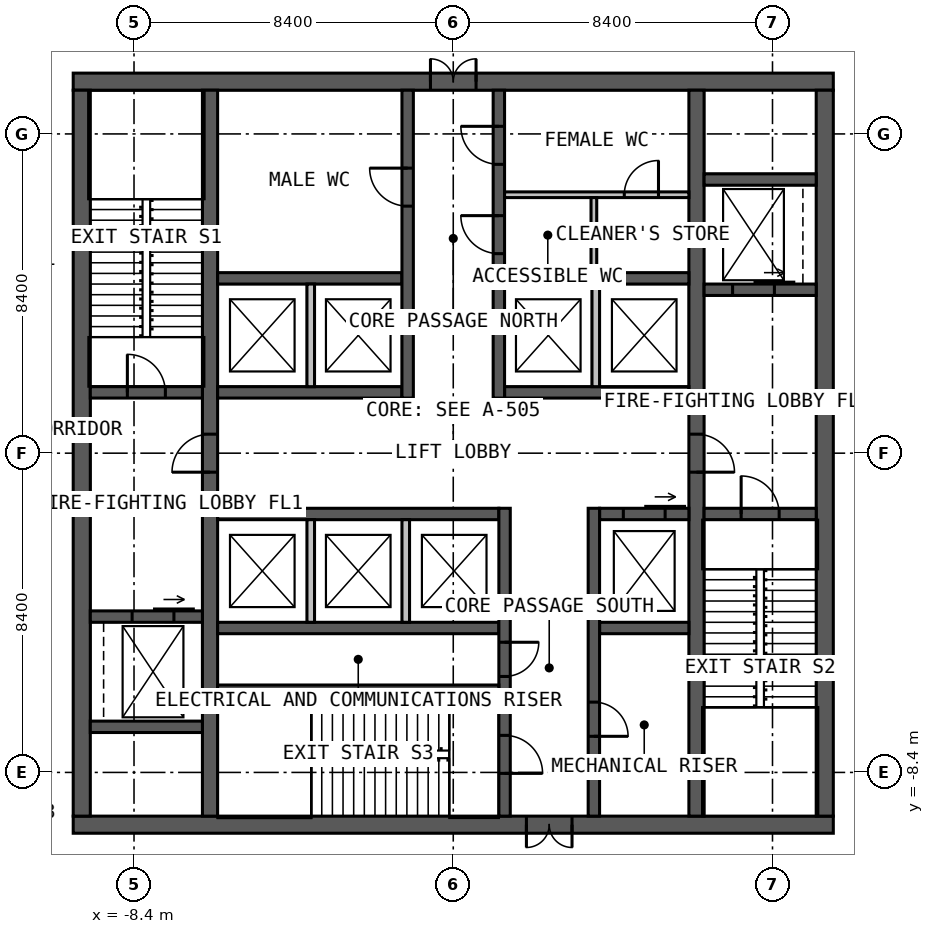
"""IFC4 building model, lengths in metres.
Left out: names, types, materials, properties, quantities, classifications, styles, units other than length and angle.
Written with IfcOpenShell. Run it as: python <this file> out.ifc"""

import sys

from ifc_helpers import new_model, si_unit, direction, frame, frame_2d, origin, place, context, subcontext, project, spatial, rectangle, extrude, element, fill, save


model = new_model("IFC4")
c1 = context("Model", 3, precision=1e-05, world=origin(), true_north=direction((0.0, 1.0)))
c2 = subcontext(c1, "Body", "Model", "MODEL_VIEW")
j1 = project(units=[si_unit("LENGTHUNIT", "METRE"), si_unit("PLANEANGLEUNIT", "RADIAN")], contexts=[c1])
p1 = place(None, origin())
s1 = spatial("IfcSite", under=j1, at=p1, CompositionType="ELEMENT")
p2 = place(p1, origin())
s2 = spatial("IfcBuilding", under=s1, at=p2, CompositionType="ELEMENT")
p3 = place(p2, frame((0.0, 0.0, 215.0)))
s3 = spatial("IfcBuildingStorey", under=s2, at=p3, CompositionType="ELEMENT", Elevation=215.0)
p4 = place(p3, frame((-10.0, 9.775, 0.0), z_axis=(0.0, 0.0, 1.0), x_axis=(1.0, 0.0, 0.0)))
e1 = element("IfcWall", 1, at=p4, inside=s3, PredefinedType="SOLIDWALL", context=c2, shape_type="SweptSolid", body=[
    extrude(rectangle(XDim=20.0, YDim=0.45, at=frame_2d((10.0, 0.0))), origin(), (0.0, 0.0, 1.0), 5.0),
])
p5 = place(p4, frame((9.4, 0.0, 0.0)))
e2 = element("IfcOpeningElement", 2, at=p5, cuts=e1, PredefinedType="OPENING", context=c2, shape_type="SweptSolid", body=[
    extrude(rectangle(XDim=1.2, YDim=2.2, at=frame_2d((0.6, 1.1))), frame((0.0, 0.235, 0.0), z_axis=(0.0, -1.0, 0.0), x_axis=(1.0, 0.0, 0.0)), (0.0, 0.0, 1.0), 0.47),
])
p6 = place(p3, frame((10.0, -9.775, 0.0), z_axis=(0.0, 0.0, 1.0), x_axis=(-1.0, 0.0, 0.0)))
e3 = element("IfcWall", 3, at=p6, inside=s3, PredefinedType="SOLIDWALL", context=c2, shape_type="SweptSolid", body=[
    extrude(rectangle(XDim=20.0, YDim=0.45, at=frame_2d((10.0, 0.0))), origin(), (0.0, 0.0, 1.0), 5.0),
])
p7 = place(p6, frame((6.875, 0.0, 0.0)))
e4 = element("IfcOpeningElement", 4, at=p7, cuts=e3, PredefinedType="OPENING", context=c2, shape_type="SweptSolid", body=[
    extrude(rectangle(XDim=1.2, YDim=2.2, at=frame_2d((0.6, 1.1))), frame((0.0, 0.235, 0.0), z_axis=(0.0, -1.0, 0.0), x_axis=(1.0, 0.0, 0.0)), (0.0, 0.0, 1.0), 0.47),
])
for number, where, z_axis, x_axis in (
    (5, (9.775, -9.55, 0.0), (0.0, 0.0, 1.0), (0.0, 1.0, 0.0)),
    (6, (-9.775, 9.55, 0.0), (0.0, 0.0, 1.0), (0.0, -1.0, 0.0)),
):
    element("IfcWall", number, at=place(p3, frame(where, z_axis=z_axis, x_axis=x_axis)), inside=s3, PredefinedType="SOLIDWALL", context=c2, shape_type="SweptSolid", body=[
        extrude(rectangle(XDim=19.1, YDim=0.45, at=frame_2d((9.55, 0.0))), origin(), (0.0, 0.0, 1.0), 5.0),
    ])
p8 = place(p3, frame((-6.4, -9.55, 0.0), z_axis=(0.0, 0.0, 1.0), x_axis=(0.0, 1.0, 0.0)))
e7 = element("IfcWall", 7, at=p8, inside=s3, PredefinedType="SOLIDWALL", context=c2, shape_type="SweptSolid", body=[
    extrude(rectangle(XDim=19.1, YDim=0.4, at=frame_2d((9.55, 0.0))), origin(), (0.0, 0.0, 1.0), 5.0),
])
p9 = place(p8, frame((9.05, 0.0, 0.0)))
e8 = element("IfcOpeningElement", 8, at=p9, cuts=e7, PredefinedType="OPENING", context=c2, shape_type="SweptSolid", body=[
    extrude(rectangle(XDim=1.0, YDim=2.2, at=frame_2d((0.5, 1.1))), frame((0.0, 0.21, 0.0), z_axis=(0.0, -1.0, 0.0), x_axis=(1.0, 0.0, 0.0)), (0.0, 0.0, 1.0), 0.42),
])
p10 = place(p3, frame((6.4, 9.55, 0.0), z_axis=(0.0, 0.0, 1.0), x_axis=(0.0, -1.0, 0.0)))
e9 = element("IfcWall", 9, at=p10, inside=s3, PredefinedType="SOLIDWALL", context=c2, shape_type="SweptSolid", body=[
    extrude(rectangle(XDim=19.1, YDim=0.4, at=frame_2d((9.55, 0.0))), origin(), (0.0, 0.0, 1.0), 5.0),
])
p11 = place(p10, frame((9.05, 0.0, 0.0)))
e10 = element("IfcOpeningElement", 10, at=p11, cuts=e9, PredefinedType="OPENING", context=c2, shape_type="SweptSolid", body=[
    extrude(rectangle(XDim=1.0, YDim=2.2, at=frame_2d((0.5, 1.1))), frame((0.0, 0.21, 0.0), z_axis=(0.0, -1.0, 0.0), x_axis=(1.0, 0.0, 0.0)), (0.0, 0.0, 1.0), 0.42),
])
for number, where, z_axis, x_axis in (
    (11, (-6.2, 1.6, 0.0), (0.0, 0.0, 1.0), (1.0, 0.0, 0.0)),
    (12, (1.35, 1.6, 0.0), (0.0, 0.0, 1.0), (1.0, 0.0, 0.0)),
    (13, (-6.2, 4.6, 0.0), (0.0, 0.0, 1.0), (1.0, 0.0, 0.0)),
    (14, (1.35, 4.6, 0.0), (0.0, 0.0, 1.0), (1.0, 0.0, 0.0)),
):
    element("IfcWall", number, at=place(p3, frame(where, z_axis=z_axis, x_axis=x_axis)), inside=s3, PredefinedType="SOLIDWALL", context=c2, shape_type="SweptSolid", body=[
        extrude(rectangle(XDim=4.85, YDim=0.3, at=frame_2d((2.425, 0.0))), origin(), (0.0, 0.0, 1.0), 5.0),
    ])
p12 = place(p3, frame((-1.2, 1.45, 0.0), z_axis=(0.0, 0.0, 1.0), x_axis=(0.0, 1.0, 0.0)))
e15 = element("IfcWall", 15, at=p12, inside=s3, PredefinedType="SOLIDWALL", context=c2, shape_type="SweptSolid", body=[
    extrude(rectangle(XDim=8.1, YDim=0.3, at=frame_2d((4.05, 0.0))), origin(), (0.0, 0.0, 1.0), 5.0),
])
p13 = place(p12, frame((5.05, 0.0, 0.0)))
e16 = element("IfcOpeningElement", 16, at=p13, cuts=e15, PredefinedType="OPENING", context=c2, shape_type="SweptSolid", body=[
    extrude(rectangle(XDim=1.0, YDim=2.2, at=frame_2d((0.5, 1.1))), frame((0.0, 0.16, 0.0), z_axis=(0.0, -1.0, 0.0), x_axis=(1.0, 0.0, 0.0)), (0.0, 0.0, 1.0), 0.32),
])
p14 = place(p3, frame((1.2, 1.45, 0.0), z_axis=(0.0, 0.0, 1.0), x_axis=(0.0, 1.0, 0.0)))
e17 = element("IfcWall", 17, at=p14, inside=s3, PredefinedType="SOLIDWALL", context=c2, shape_type="SweptSolid", body=[
    extrude(rectangle(XDim=8.1, YDim=0.3, at=frame_2d((4.05, 0.0))), origin(), (0.0, 0.0, 1.0), 5.0),
])
p15 = place(p14, frame((3.8, 0.0, 0.0)))
e18 = element("IfcOpeningElement", 18, at=p15, cuts=e17, PredefinedType="OPENING", context=c2, shape_type="SweptSolid", body=[
    extrude(rectangle(XDim=1.0, YDim=2.2, at=frame_2d((0.5, 1.1))), frame((0.0, 0.16, 0.0), z_axis=(0.0, -1.0, 0.0), x_axis=(1.0, 0.0, 0.0)), (0.0, 0.0, 1.0), 0.32),
])
p16 = place(p14, frame((6.15, 0.0, 0.0)))
e19 = element("IfcOpeningElement", 19, at=p16, cuts=e17, PredefinedType="OPENING", context=c2, shape_type="SweptSolid", body=[
    extrude(rectangle(XDim=1.0, YDim=2.2, at=frame_2d((0.5, 1.1))), frame((0.0, 0.16, 0.0), z_axis=(0.0, -1.0, 0.0), x_axis=(1.0, 0.0, 0.0)), (0.0, 0.0, 1.0), 0.32),
])
p17 = place(p3, frame((-6.2, -1.6, 0.0), z_axis=(0.0, 0.0, 1.0), x_axis=(1.0, 0.0, 0.0)))
e20 = element("IfcWall", 20, at=p17, inside=s3, PredefinedType="SOLIDWALL", context=c2, shape_type="SweptSolid", body=[
    extrude(rectangle(XDim=7.4, YDim=0.3, at=frame_2d((3.7, 0.0))), origin(), (0.0, 0.0, 1.0), 5.0),
])
p18 = place(p3, frame((3.85, -1.6, 0.0), z_axis=(0.0, 0.0, 1.0), x_axis=(1.0, 0.0, 0.0)))
e21 = element("IfcWall", 21, at=p18, inside=s3, PredefinedType="SOLIDWALL", context=c2, shape_type="SweptSolid", body=[
    extrude(rectangle(XDim=2.35, YDim=0.3, at=frame_2d((1.175, 0.0))), origin(), (0.0, 0.0, 1.0), 5.0),
])
p19 = place(p18, frame((0.625, 0.0, 0.0)))
e22 = element("IfcOpeningElement", 22, at=p19, cuts=e21, PredefinedType="OPENING", context=c2, shape_type="SweptSolid", body=[
    extrude(rectangle(XDim=1.1, YDim=2.2, at=frame_2d((0.55, 1.1))), frame((0.0, 0.16, 0.0), z_axis=(0.0, -1.0, 0.0), x_axis=(1.0, 0.0, 0.0)), (0.0, 0.0, 1.0), 0.32),
])
p20 = place(p3, frame((-6.2, -4.6, 0.0), z_axis=(0.0, 0.0, 1.0), x_axis=(1.0, 0.0, 0.0)))
e23 = element("IfcWall", 23, at=p20, inside=s3, PredefinedType="SOLIDWALL", context=c2, shape_type="SweptSolid", body=[
    extrude(rectangle(XDim=7.4, YDim=0.3, at=frame_2d((3.7, 0.0))), origin(), (0.0, 0.0, 1.0), 5.0),
])
p21 = place(p3, frame((3.85, -4.6, 0.0), z_axis=(0.0, 0.0, 1.0), x_axis=(1.0, 0.0, 0.0)))
e24 = element("IfcWall", 24, at=p21, inside=s3, PredefinedType="SOLIDWALL", context=c2, shape_type="SweptSolid", body=[
    extrude(rectangle(XDim=2.35, YDim=0.3, at=frame_2d((1.175, 0.0))), origin(), (0.0, 0.0, 1.0), 5.0),
])
p22 = place(p3, frame((1.35, -1.45, 0.0), z_axis=(0.0, 0.0, 1.0), x_axis=(0.0, -1.0, 0.0)))
e25 = element("IfcWall", 25, at=p22, inside=s3, PredefinedType="SOLIDWALL", context=c2, shape_type="SweptSolid", body=[
    extrude(rectangle(XDim=8.1, YDim=0.3, at=frame_2d((4.05, 0.0))), origin(), (0.0, 0.0, 1.0), 5.0),
])
p23 = place(p22, frame((5.975, 0.0, 0.0)))
e26 = element("IfcOpeningElement", 26, at=p23, cuts=e25, PredefinedType="OPENING", context=c2, shape_type="SweptSolid", body=[
    extrude(rectangle(XDim=1.0, YDim=2.2, at=frame_2d((0.5, 1.1))), frame((0.0, 0.16, 0.0), z_axis=(0.0, -1.0, 0.0), x_axis=(1.0, 0.0, 0.0)), (0.0, 0.0, 1.0), 0.32),
])
p24 = place(p22, frame((3.525, 0.0, 0.0)))
e27 = element("IfcOpeningElement", 27, at=p24, cuts=e25, PredefinedType="OPENING", context=c2, shape_type="SweptSolid", body=[
    extrude(rectangle(XDim=0.9, YDim=2.2, at=frame_2d((0.45, 1.1))), frame((0.0, 0.16, 0.0), z_axis=(0.0, -1.0, 0.0), x_axis=(1.0, 0.0, 0.0)), (0.0, 0.0, 1.0), 0.32),
])
p25 = place(p3, frame((3.7, -1.45, 0.0), z_axis=(0.0, 0.0, 1.0), x_axis=(0.0, -1.0, 0.0)))
e28 = element("IfcWall", 28, at=p25, inside=s3, PredefinedType="SOLIDWALL", context=c2, shape_type="SweptSolid", body=[
    extrude(rectangle(XDim=8.1, YDim=0.3, at=frame_2d((4.05, 0.0))), origin(), (0.0, 0.0, 1.0), 5.0),
])
p26 = place(p25, frame((5.1, 0.0, 0.0)))
e29 = element("IfcOpeningElement", 29, at=p26, cuts=e28, PredefinedType="OPENING", context=c2, shape_type="SweptSolid", body=[
    extrude(rectangle(XDim=0.9, YDim=2.2, at=frame_2d((0.45, 1.1))), frame((0.0, 0.16, 0.0), z_axis=(0.0, -1.0, 0.0), x_axis=(1.0, 0.0, 0.0)), (0.0, 0.0, 1.0), 0.32),
])
p27 = place(p3, frame((-6.2, -6.2, 0.0), z_axis=(0.0, 0.0, 1.0), x_axis=(1.0, 0.0, 0.0)))
e30 = element("IfcWall", 30, at=p27, inside=s3, PredefinedType="SOLIDWALL", context=c2, shape_type="SweptSolid", body=[
    extrude(rectangle(XDim=7.4, YDim=0.2, at=frame_2d((3.7, 0.0))), origin(), (0.0, 0.0, 1.0), 5.0),
])
p28 = place(p3, frame((-9.55, 1.6, 0.0), z_axis=(0.0, 0.0, 1.0), x_axis=(1.0, 0.0, 0.0)))
e31 = element("IfcWall", 31, at=p28, inside=s3, PredefinedType="SOLIDWALL", context=c2, shape_type="SweptSolid", body=[
    extrude(rectangle(XDim=2.95, YDim=0.3, at=frame_2d((1.475, 0.0))), origin(), (0.0, 0.0, 1.0), 5.0),
])
p29 = place(p28, frame((0.975, 0.0, 0.0)))
e32 = element("IfcOpeningElement", 32, at=p29, cuts=e31, PredefinedType="OPENING", context=c2, shape_type="SweptSolid", body=[
    extrude(rectangle(XDim=1.0, YDim=2.2, at=frame_2d((0.5, 1.1))), frame((0.0, 0.16, 0.0), z_axis=(0.0, -1.0, 0.0), x_axis=(1.0, 0.0, 0.0)), (0.0, 0.0, 1.0), 0.32),
])
p30 = place(p3, frame((6.6, -1.6, 0.0), z_axis=(0.0, 0.0, 1.0), x_axis=(1.0, 0.0, 0.0)))
e33 = element("IfcWall", 33, at=p30, inside=s3, PredefinedType="SOLIDWALL", context=c2, shape_type="SweptSolid", body=[
    extrude(rectangle(XDim=2.95, YDim=0.3, at=frame_2d((1.475, 0.0))), origin(), (0.0, 0.0, 1.0), 5.0),
])
p31 = place(p30, frame((0.975, 0.0, 0.0)))
e34 = element("IfcOpeningElement", 34, at=p31, cuts=e33, PredefinedType="OPENING", context=c2, shape_type="SweptSolid", body=[
    extrude(rectangle(XDim=1.0, YDim=2.2, at=frame_2d((0.5, 1.1))), frame((0.0, 0.16, 0.0), z_axis=(0.0, -1.0, 0.0), x_axis=(1.0, 0.0, 0.0)), (0.0, 0.0, 1.0), 0.32),
])
p32 = place(p3, frame((-9.55, -4.3, 0.0), z_axis=(0.0, 0.0, 1.0), x_axis=(1.0, 0.0, 0.0)))
e35 = element("IfcWall", 35, at=p32, inside=s3, PredefinedType="SOLIDWALL", context=c2, shape_type="SweptSolid", body=[
    extrude(rectangle(XDim=2.95, YDim=0.3, at=frame_2d((1.475, 0.0))), origin(), (0.0, 0.0, 1.0), 5.0),
])
p33 = place(p32, frame((1.1, 0.0, 0.0)))
e36 = element("IfcOpeningElement", 36, at=p33, cuts=e35, PredefinedType="OPENING", context=c2, shape_type="SweptSolid", body=[
    extrude(rectangle(XDim=1.1, YDim=2.2, at=frame_2d((0.55, 1.1))), frame((0.0, 0.16, 0.0), z_axis=(0.0, -1.0, 0.0), x_axis=(1.0, 0.0, 0.0)), (0.0, 0.0, 1.0), 0.32),
])
p34 = place(p3, frame((6.6, 4.3, 0.0), z_axis=(0.0, 0.0, 1.0), x_axis=(1.0, 0.0, 0.0)))
e37 = element("IfcWall", 37, at=p34, inside=s3, PredefinedType="SOLIDWALL", context=c2, shape_type="SweptSolid", body=[
    extrude(rectangle(XDim=2.95, YDim=0.3, at=frame_2d((1.475, 0.0))), origin(), (0.0, 0.0, 1.0), 5.0),
])
p35 = place(p34, frame((0.75, 0.0, 0.0)))
e38 = element("IfcOpeningElement", 38, at=p35, cuts=e37, PredefinedType="OPENING", context=c2, shape_type="SweptSolid", body=[
    extrude(rectangle(XDim=1.1, YDim=2.2, at=frame_2d((0.55, 1.1))), frame((0.0, 0.16, 0.0), z_axis=(0.0, -1.0, 0.0), x_axis=(1.0, 0.0, 0.0)), (0.0, 0.0, 1.0), 0.32),
])
for number, where, z_axis, x_axis in (
    (39, (-9.55, -7.2, 0.0), (0.0, 0.0, 1.0), (1.0, 0.0, 0.0)),
    (40, (6.6, 7.2, 0.0), (0.0, 0.0, 1.0), (1.0, 0.0, 0.0)),
):
    element("IfcWall", number, at=place(p3, frame(where, z_axis=z_axis, x_axis=x_axis)), inside=s3, PredefinedType="SOLIDWALL", context=c2, shape_type="SweptSolid", body=[
        extrude(rectangle(XDim=2.95, YDim=0.3, at=frame_2d((1.475, 0.0))), origin(), (0.0, 0.0, 1.0), 5.0),
    ])
for number, where, z_axis, x_axis in (
    (41, (-3.75, 1.75, 0.0), (0.0, 0.0, 1.0), (0.0, 1.0, 0.0)),
    (42, (3.75, 1.75, 0.0), (0.0, 0.0, 1.0), (0.0, 1.0, 0.0)),
    (43, (-3.75, -1.75, 0.0), (0.0, 0.0, 1.0), (0.0, -1.0, 0.0)),
    (44, (-1.25, -1.75, 0.0), (0.0, 0.0, 1.0), (0.0, -1.0, 0.0)),
):
    element("IfcWall", number, at=place(p3, frame(where, z_axis=z_axis, x_axis=x_axis)), inside=s3, PredefinedType="SOLIDWALL", context=c2, shape_type="SweptSolid", body=[
        extrude(rectangle(XDim=2.7, YDim=0.2, at=frame_2d((1.35, 0.0))), origin(), (0.0, 0.0, 1.0), 4.75),
    ])
p36 = place(p3, frame((1.35, 6.8, 0.0), z_axis=(0.0, 0.0, 1.0), x_axis=(1.0, 0.0, 0.0)))
e45 = element("IfcWall", 45, at=p36, inside=s3, PredefinedType="PARTITIONING", context=c2, shape_type="SweptSolid", body=[
    extrude(rectangle(XDim=4.85, YDim=0.15, at=frame_2d((2.425, 0.0))), origin(), (0.0, 0.0, 1.0), 4.75),
])
p37 = place(p36, frame((3.15, 0.0, 0.0)))
e46 = element("IfcOpeningElement", 46, at=p37, cuts=e45, PredefinedType="OPENING", context=c2, shape_type="SweptSolid", body=[
    extrude(rectangle(XDim=0.9, YDim=2.2, at=frame_2d((0.45, 1.1))), frame((0.0, 0.085, 0.0), z_axis=(0.0, -1.0, 0.0), x_axis=(1.0, 0.0, 0.0)), (0.0, 0.0, 1.0), 0.17),
])
p38 = place(p3, frame((3.7, 4.75, 0.0), z_axis=(0.0, 0.0, 1.0), x_axis=(0.0, 1.0, 0.0)))
e47 = element("IfcWall", 47, at=p38, inside=s3, PredefinedType="PARTITIONING", context=c2, shape_type="SweptSolid", body=[
    extrude(rectangle(XDim=1.975, YDim=0.15, at=frame_2d((0.988, 0.0))), origin(), (0.0, 0.0, 1.0), 4.75),
])
p39 = place(p5, origin())
e48 = element("IfcDoor", 48, at=p39, inside=s3, OperationType="DOUBLE_DOOR_SINGLE_SWING", PredefinedType="DOOR", context=c2, shape_type="SweptSolid", body=[
    extrude(rectangle(XDim=1.2, YDim=2.2, at=frame_2d((0.6, 1.1))), frame((0.0, 0.025, 0.0), z_axis=(0.0, -1.0, 0.0), x_axis=(1.0, 0.0, 0.0)), (0.0, 0.0, 1.0), 0.05),
])
fill(e2, e48)
p40 = place(p7, origin())
e49 = element("IfcDoor", 49, at=p40, inside=s3, OperationType="DOUBLE_DOOR_SINGLE_SWING", PredefinedType="DOOR", context=c2, shape_type="SweptSolid", body=[
    extrude(rectangle(XDim=1.2, YDim=2.2, at=frame_2d((0.6, 1.1))), frame((0.0, 0.025, 0.0), z_axis=(0.0, -1.0, 0.0), x_axis=(1.0, 0.0, 0.0)), (0.0, 0.0, 1.0), 0.05),
])
fill(e4, e49)
p41 = place(p9, origin())
e50 = element("IfcDoor", 50, at=p41, inside=s3, OperationType="SINGLE_SWING_LEFT", PredefinedType="DOOR", context=c2, shape_type="SweptSolid", body=[
    extrude(rectangle(XDim=1.0, YDim=2.2, at=frame_2d((0.5, 1.1))), frame((0.0, 0.025, 0.0), z_axis=(0.0, -1.0, 0.0), x_axis=(1.0, 0.0, 0.0)), (0.0, 0.0, 1.0), 0.05),
])
fill(e8, e50)
p42 = place(p11, origin())
e51 = element("IfcDoor", 51, at=p42, inside=s3, OperationType="SINGLE_SWING_RIGHT", PredefinedType="DOOR", context=c2, shape_type="SweptSolid", body=[
    extrude(rectangle(XDim=1.0, YDim=2.2, at=frame_2d((0.5, 1.1))), frame((0.0, 0.025, 0.0), z_axis=(0.0, -1.0, 0.0), x_axis=(1.0, 0.0, 0.0)), (0.0, 0.0, 1.0), 0.05),
])
fill(e10, e51)
p43 = place(p29, origin())
e52 = element("IfcDoor", 52, at=p43, inside=s3, OperationType="SINGLE_SWING_LEFT", PredefinedType="DOOR", context=c2, shape_type="SweptSolid", body=[
    extrude(rectangle(XDim=1.0, YDim=2.2, at=frame_2d((0.5, 1.1))), frame((0.0, 0.025, 0.0), z_axis=(0.0, -1.0, 0.0), x_axis=(1.0, 0.0, 0.0)), (0.0, 0.0, 1.0), 0.05),
])
fill(e32, e52)
p44 = place(p31, origin())
e53 = element("IfcDoor", 53, at=p44, inside=s3, OperationType="SINGLE_SWING_LEFT", PredefinedType="DOOR", context=c2, shape_type="SweptSolid", body=[
    extrude(rectangle(XDim=1.0, YDim=2.2, at=frame_2d((0.5, 1.1))), frame((0.0, 0.025, 0.0), z_axis=(0.0, -1.0, 0.0), x_axis=(1.0, 0.0, 0.0)), (0.0, 0.0, 1.0), 0.05),
])
fill(e34, e53)
p45 = place(p23, origin())
e54 = element("IfcDoor", 54, at=p45, inside=s3, OperationType="SINGLE_SWING_RIGHT", PredefinedType="DOOR", context=c2, shape_type="SweptSolid", body=[
    extrude(rectangle(XDim=1.0, YDim=2.2, at=frame_2d((0.5, 1.1))), frame((0.0, 0.025, 0.0), z_axis=(0.0, -1.0, 0.0), x_axis=(1.0, 0.0, 0.0)), (0.0, 0.0, 1.0), 0.05),
])
fill(e26, e54)
p46 = place(p13, origin())
e55 = element("IfcDoor", 55, at=p46, inside=s3, OperationType="SINGLE_SWING_RIGHT", PredefinedType="DOOR", context=c2, shape_type="SweptSolid", body=[
    extrude(rectangle(XDim=1.0, YDim=2.2, at=frame_2d((0.5, 1.1))), frame((0.0, 0.025, 0.0), z_axis=(0.0, -1.0, 0.0), x_axis=(1.0, 0.0, 0.0)), (0.0, 0.0, 1.0), 0.05),
])
fill(e16, e55)
p47 = place(p15, origin())
e56 = element("IfcDoor", 56, at=p47, inside=s3, OperationType="SINGLE_SWING_RIGHT", PredefinedType="DOOR", context=c2, shape_type="SweptSolid", body=[
    extrude(rectangle(XDim=1.0, YDim=2.2, at=frame_2d((0.5, 1.1))), frame((0.0, 0.025, 0.0), z_axis=(0.0, -1.0, 0.0), x_axis=(1.0, 0.0, 0.0)), (0.0, 0.0, 1.0), 0.05),
])
fill(e18, e56)
p48 = place(p16, origin())
e57 = element("IfcDoor", 57, at=p48, inside=s3, OperationType="SINGLE_SWING_RIGHT", PredefinedType="DOOR", context=c2, shape_type="SweptSolid", body=[
    extrude(rectangle(XDim=1.0, YDim=2.2, at=frame_2d((0.5, 1.1))), frame((0.0, 0.025, 0.0), z_axis=(0.0, -1.0, 0.0), x_axis=(1.0, 0.0, 0.0)), (0.0, 0.0, 1.0), 0.05),
])
fill(e19, e57)
p49 = place(p24, origin())
e58 = element("IfcDoor", 58, at=p49, inside=s3, OperationType="SINGLE_SWING_LEFT", PredefinedType="DOOR", context=c2, shape_type="SweptSolid", body=[
    extrude(rectangle(XDim=0.9, YDim=2.2, at=frame_2d((0.45, 1.1))), frame((0.0, 0.025, 0.0), z_axis=(0.0, -1.0, 0.0), x_axis=(1.0, 0.0, 0.0)), (0.0, 0.0, 1.0), 0.05),
])
fill(e27, e58)
p50 = place(p26, origin())
e59 = element("IfcDoor", 59, at=p50, inside=s3, OperationType="SINGLE_SWING_RIGHT", PredefinedType="DOOR", context=c2, shape_type="SweptSolid", body=[
    extrude(rectangle(XDim=0.9, YDim=2.2, at=frame_2d((0.45, 1.1))), frame((0.0, 0.025, 0.0), z_axis=(0.0, -1.0, 0.0), x_axis=(1.0, 0.0, 0.0)), (0.0, 0.0, 1.0), 0.05),
])
fill(e29, e59)
p51 = place(p37, origin())
e60 = element("IfcDoor", 60, at=p51, inside=s3, OperationType="SINGLE_SWING_RIGHT", PredefinedType="DOOR", context=c2, shape_type="SweptSolid", body=[
    extrude(rectangle(XDim=0.9, YDim=2.2, at=frame_2d((0.45, 1.1))), frame((0.0, 0.025, 0.0), z_axis=(0.0, -1.0, 0.0), x_axis=(1.0, 0.0, 0.0)), (0.0, 0.0, 1.0), 0.05),
])
fill(e46, e60)
p52 = place(p19, origin())
e61 = element("IfcDoor", 61, at=p52, inside=s3, OperationType="SLIDING_TO_LEFT", PredefinedType="DOOR", context=c2, shape_type="SweptSolid", body=[
    extrude(rectangle(XDim=1.1, YDim=2.2, at=frame_2d((0.55, 1.1))), frame((0.0, 0.025, 0.0), z_axis=(0.0, -1.0, 0.0), x_axis=(1.0, 0.0, 0.0)), (0.0, 0.0, 1.0), 0.05),
])
fill(e22, e61)
p53 = place(p33, origin())
e62 = element("IfcDoor", 62, at=p53, inside=s3, OperationType="SLIDING_TO_LEFT", PredefinedType="DOOR", context=c2, shape_type="SweptSolid", body=[
    extrude(rectangle(XDim=1.1, YDim=2.2, at=frame_2d((0.55, 1.1))), frame((0.0, 0.025, 0.0), z_axis=(0.0, -1.0, 0.0), x_axis=(1.0, 0.0, 0.0)), (0.0, 0.0, 1.0), 0.05),
])
fill(e36, e62)
p54 = place(p35, origin())
e63 = element("IfcDoor", 63, at=p54, inside=s3, OperationType="SLIDING_TO_LEFT", PredefinedType="DOOR", context=c2, shape_type="SweptSolid", body=[
    extrude(rectangle(XDim=1.1, YDim=2.2, at=frame_2d((0.55, 1.1))), frame((0.0, 0.025, 0.0), z_axis=(0.0, -1.0, 0.0), x_axis=(1.0, 0.0, 0.0)), (0.0, 0.0, 1.0), 0.05),
])
fill(e38, e63)
save(model, sys.argv[1])
